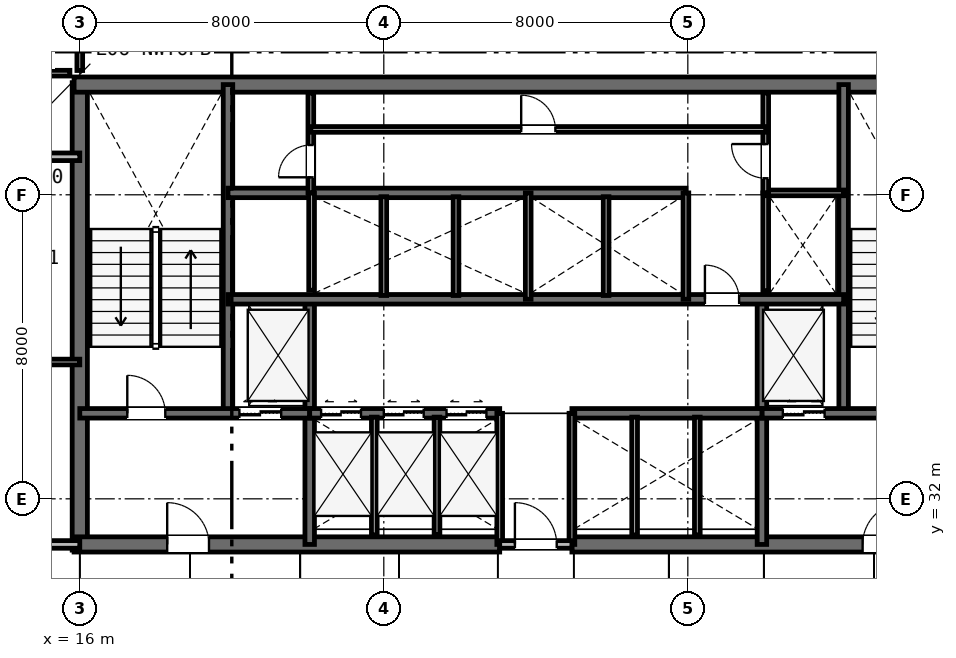
"""IFC4 building model, lengths in metres.
Left out: names, types, materials, properties, quantities, classifications, styles, units other than length and angle.
Written with IfcOpenShell. Run it as: python <this file> out.ifc"""

import sys

from ifc_helpers import new_model, si_unit, direction, frame, frame_2d, origin, place, context, subcontext, project, spatial, rectangle, extrude, element, fill, save


model = new_model("IFC4")
c1 = context("Model", 3, precision=1e-05, world=origin(), true_north=direction((0.0, 1.0)))
c2 = subcontext(c1, "Body", "Model", "MODEL_VIEW")
j1 = project(units=[si_unit("LENGTHUNIT", "METRE"), si_unit("PLANEANGLEUNIT", "RADIAN")], contexts=[c1])
p1 = place(None, origin())
s1 = spatial("IfcSite", under=j1, at=p1, CompositionType="ELEMENT")
p2 = place(p1, origin())
s2 = spatial("IfcBuilding", under=s1, at=p2, CompositionType="ELEMENT")
p3 = place(p2, frame((0.0, 0.0, 29.4)))
s3 = spatial("IfcBuildingStorey", under=s2, at=p3, CompositionType="ELEMENT", Elevation=29.4)
p4 = place(p3, frame((16.0, 30.65, 0.0), z_axis=(0.0, 0.0, 1.0), x_axis=(0.0, 1.0, 0.0)))
e1 = element("IfcWall", 1, at=p4, inside=s3, PredefinedType="SHEAR", context=c2, shape_type="SweptSolid", body=[
    extrude(rectangle(XDim=12.3, YDim=0.4, at=frame_2d((6.15, 0.0))), origin(), (0.0, 0.0, 1.0), 3.6),
])
p5 = place(p3, frame((15.85, 42.9, 0.0), z_axis=(0.0, 0.0, 1.0), x_axis=(1.0, 0.0, 0.0)))
e2 = element("IfcWall", 2, at=p5, inside=s3, PredefinedType="SHEAR", context=c2, shape_type="SweptSolid", body=[
    extrude(rectangle(XDim=24.3, YDim=0.4, at=frame_2d((12.15, 0.0))), origin(), (0.0, 0.0, 1.0), 3.6),
])
p6 = place(p3, frame((15.85, 30.8, 0.0), z_axis=(0.0, 0.0, 1.0), x_axis=(1.0, 0.0, 0.0)))
e3 = element("IfcWall", 3, at=p6, inside=s3, PredefinedType="SHEAR", context=c2, shape_type="SweptSolid", body=[
    extrude(rectangle(XDim=11.2, YDim=0.4, at=frame_2d((5.6, 0.0))), origin(), (0.0, 0.0, 1.0), 3.6),
])
p7 = place(p6, frame((2.45, 0.0, 0.0)))
e4 = element("IfcOpeningElement", 4, at=p7, cuts=e3, PredefinedType="OPENING", context=c2, shape_type="SweptSolid", body=[
    extrude(rectangle(XDim=1.1, YDim=2.15, at=frame_2d((0.55, 1.075))), frame((0.0, 0.21, 0.0), z_axis=(0.0, -1.0, 0.0), x_axis=(1.0, 0.0, 0.0)), (0.0, 0.0, 1.0), 0.42),
])
p8 = place(p3, frame((28.95, 30.8, 0.0), z_axis=(0.0, 0.0, 1.0), x_axis=(1.0, 0.0, 0.0)))
e5 = element("IfcWall", 5, at=p8, inside=s3, PredefinedType="SHEAR", context=c2, shape_type="SweptSolid", body=[
    extrude(rectangle(XDim=11.2, YDim=0.4, at=frame_2d((5.6, 0.0))), origin(), (0.0, 0.0, 1.0), 3.6),
])
p9 = place(p8, frame((7.65, 0.0, 0.0)))
e6 = element("IfcOpeningElement", 6, at=p9, cuts=e5, PredefinedType="OPENING", context=c2, shape_type="SweptSolid", body=[
    extrude(rectangle(XDim=1.1, YDim=2.15, at=frame_2d((0.55, 1.075))), frame((0.0, 0.21, 0.0), z_axis=(0.0, -1.0, 0.0), x_axis=(1.0, 0.0, 0.0)), (0.0, 0.0, 1.0), 0.42),
])
for number, where, z_axis, x_axis in (
    (7, (19.9, 34.25, 0.0), (0.0, 0.0, 1.0), (0.0, 1.0, 0.0)),
    (8, (36.1, 34.25, 0.0), (0.0, 0.0, 1.0), (0.0, 1.0, 0.0)),
):
    element("IfcWall", number, at=place(p3, frame(where, z_axis=z_axis, x_axis=x_axis)), inside=s3, PredefinedType="SHEAR", context=c2, shape_type="SweptSolid", body=[
        extrude(rectangle(XDim=8.65, YDim=0.25, at=frame_2d((4.325, 0.0))), origin(), (0.0, 0.0, 1.0), 3.6),
    ])
for number, where, z_axis, x_axis in (
    (9, (22.05, 30.8, 0.0), (0.0, 0.0, 1.0), (0.0, 1.0, 0.0)),
    (10, (33.95, 30.8, 0.0), (0.0, 0.0, 1.0), (0.0, 1.0, 0.0)),
):
    element("IfcWall", number, at=place(p3, frame(where, z_axis=z_axis, x_axis=x_axis)), inside=s3, PredefinedType="SHEAR", context=c2, shape_type="SweptSolid", body=[
        extrude(rectangle(XDim=6.45, YDim=0.25, at=frame_2d((3.225, 0.0))), origin(), (0.0, 0.0, 1.0), 3.6),
    ])
p10 = place(p3, frame((16.0, 34.25, 0.0), z_axis=(0.0, 0.0, 1.0), x_axis=(1.0, 0.0, 0.0)))
e11 = element("IfcWall", 11, at=p10, inside=s3, PredefinedType="SHEAR", context=c2, shape_type="SweptSolid", body=[
    extrude(rectangle(XDim=6.05, YDim=0.25, at=frame_2d((3.025, 0.0))), origin(), (0.0, 0.0, 1.0), 3.6),
])
p11 = place(p10, frame((1.25, 0.0, 0.0)))
e12 = element("IfcOpeningElement", 12, at=p11, cuts=e11, PredefinedType="OPENING", context=c2, shape_type="SweptSolid", body=[
    extrude(rectangle(XDim=1.0, YDim=2.15, at=frame_2d((0.5, 1.075))), frame((0.0, 0.135, 0.0), z_axis=(0.0, -1.0, 0.0), x_axis=(1.0, 0.0, 0.0)), (0.0, 0.0, 1.0), 0.27),
])
p12 = place(p10, frame((4.2, 0.0, 0.0)))
e13 = element("IfcOpeningElement", 13, at=p12, cuts=e11, PredefinedType="OPENING", context=c2, shape_type="SweptSolid", body=[
    extrude(rectangle(XDim=1.1, YDim=2.15, at=frame_2d((0.55, 1.075))), frame((0.0, 0.135, 0.0), z_axis=(0.0, -1.0, 0.0), x_axis=(1.0, 0.0, 0.0)), (0.0, 0.0, 1.0), 0.27),
])
p13 = place(p3, frame((33.95, 34.25, 0.0), z_axis=(0.0, 0.0, 1.0), x_axis=(1.0, 0.0, 0.0)))
e14 = element("IfcWall", 14, at=p13, inside=s3, PredefinedType="SHEAR", context=c2, shape_type="SweptSolid", body=[
    extrude(rectangle(XDim=6.05, YDim=0.25, at=frame_2d((3.025, 0.0))), origin(), (0.0, 0.0, 1.0), 3.6),
])
p14 = place(p13, frame((3.7, 0.0, 0.0)))
e15 = element("IfcOpeningElement", 15, at=p14, cuts=e14, PredefinedType="OPENING", context=c2, shape_type="SweptSolid", body=[
    extrude(rectangle(XDim=1.0, YDim=2.15, at=frame_2d((0.5, 1.075))), frame((0.0, 0.135, 0.0), z_axis=(0.0, -1.0, 0.0), x_axis=(1.0, 0.0, 0.0)), (0.0, 0.0, 1.0), 0.27),
])
p15 = place(p13, frame((0.55, 0.0, 0.0)))
e16 = element("IfcOpeningElement", 16, at=p15, cuts=e14, PredefinedType="OPENING", context=c2, shape_type="SweptSolid", body=[
    extrude(rectangle(XDim=1.1, YDim=2.15, at=frame_2d((0.55, 1.075))), frame((0.0, 0.135, 0.0), z_axis=(0.0, -1.0, 0.0), x_axis=(1.0, 0.0, 0.0)), (0.0, 0.0, 1.0), 0.27),
])
p16 = place(p3, frame((22.05, 34.25, 0.0), z_axis=(0.0, 0.0, 1.0), x_axis=(1.0, 0.0, 0.0)))
e17 = element("IfcWall", 17, at=p16, inside=s3, PredefinedType="SHEAR", context=c2, shape_type="SweptSolid", body=[
    extrude(rectangle(XDim=5.0, YDim=0.25, at=frame_2d((2.5, 0.0))), origin(), (0.0, 0.0, 1.0), 3.6),
])
p17 = place(p16, frame((0.3, 0.0, 0.0)))
e18 = element("IfcOpeningElement", 18, at=p17, cuts=e17, PredefinedType="OPENING", context=c2, shape_type="SweptSolid", body=[
    extrude(rectangle(XDim=1.05, YDim=2.15, at=frame_2d((0.525, 1.075))), frame((0.0, 0.135, 0.0), z_axis=(0.0, -1.0, 0.0), x_axis=(1.0, 0.0, 0.0)), (0.0, 0.0, 1.0), 0.27),
])
p18 = place(p16, frame((1.95, 0.0, 0.0)))
e19 = element("IfcOpeningElement", 19, at=p18, cuts=e17, PredefinedType="OPENING", context=c2, shape_type="SweptSolid", body=[
    extrude(rectangle(XDim=1.05, YDim=2.15, at=frame_2d((0.525, 1.075))), frame((0.0, 0.135, 0.0), z_axis=(0.0, -1.0, 0.0), x_axis=(1.0, 0.0, 0.0)), (0.0, 0.0, 1.0), 0.27),
])
p19 = place(p16, frame((3.6, 0.0, 0.0)))
e20 = element("IfcOpeningElement", 20, at=p19, cuts=e17, PredefinedType="OPENING", context=c2, shape_type="SweptSolid", body=[
    extrude(rectangle(XDim=1.05, YDim=2.15, at=frame_2d((0.525, 1.075))), frame((0.0, 0.135, 0.0), z_axis=(0.0, -1.0, 0.0), x_axis=(1.0, 0.0, 0.0)), (0.0, 0.0, 1.0), 0.27),
])
p20 = place(p3, frame((28.95, 34.25, 0.0), z_axis=(0.0, 0.0, 1.0), x_axis=(1.0, 0.0, 0.0)))
e21 = element("IfcWall", 21, at=p20, inside=s3, PredefinedType="SHEAR", context=c2, shape_type="SweptSolid", body=[
    extrude(rectangle(XDim=5.0, YDim=0.25, at=frame_2d((2.5, 0.0))), origin(), (0.0, 0.0, 1.0), 3.6),
])
p21 = place(p3, frame((19.9, 37.25, 0.0), z_axis=(0.0, 0.0, 1.0), x_axis=(1.0, 0.0, 0.0)))
e22 = element("IfcWall", 22, at=p21, inside=s3, PredefinedType="SHEAR", context=c2, shape_type="SweptSolid", body=[
    extrude(rectangle(XDim=16.2, YDim=0.25, at=frame_2d((8.1, 0.0))), origin(), (0.0, 0.0, 1.0), 3.6),
])
p22 = place(p21, frame((12.55, 0.0, 0.0)))
e23 = element("IfcOpeningElement", 23, at=p22, cuts=e22, PredefinedType="OPENING", context=c2, shape_type="SweptSolid", body=[
    extrude(rectangle(XDim=0.9, YDim=2.15, at=frame_2d((0.45, 1.075))), frame((0.0, 0.135, 0.0), z_axis=(0.0, -1.0, 0.0), x_axis=(1.0, 0.0, 0.0)), (0.0, 0.0, 1.0), 0.27),
])
p23 = place(p3, frame((19.9, 40.05, 0.0), z_axis=(0.0, 0.0, 1.0), x_axis=(1.0, 0.0, 0.0)))
e24 = element("IfcWall", 24, at=p23, inside=s3, PredefinedType="SHEAR", context=c2, shape_type="SweptSolid", body=[
    extrude(rectangle(XDim=12.05, YDim=0.25, at=frame_2d((6.025, 0.0))), origin(), (0.0, 0.0, 1.0), 3.6),
])
for number, where, z_axis, x_axis in (
    (25, (27.05, 30.8, 0.0), (0.0, 0.0, 1.0), (0.0, 1.0, 0.0)),
    (26, (28.95, 30.8, 0.0), (0.0, 0.0, 1.0), (0.0, 1.0, 0.0)),
):
    element("IfcWall", number, at=place(p3, frame(where, z_axis=z_axis, x_axis=x_axis)), inside=s3, PredefinedType="PLUMBINGWALL", context=c2, shape_type="SweptSolid", body=[
        extrude(rectangle(XDim=3.45, YDim=0.15, at=frame_2d((1.725, 0.0))), origin(), (0.0, 0.0, 1.0), 3.33),
    ])
p24 = place(p3, frame((27.05, 30.8, 0.0), z_axis=(0.0, 0.0, 1.0), x_axis=(1.0, 0.0, 0.0)))
e27 = element("IfcWall", 27, at=p24, inside=s3, PredefinedType="PARTITIONING", context=c2, shape_type="SweptSolid", body=[
    extrude(rectangle(XDim=1.9, YDim=0.2, at=frame_2d((0.95, 0.0))), origin(), (0.0, 0.0, 1.0), 3.33),
])
p25 = place(p24, frame((0.4, 0.0, 0.0)))
e28 = element("IfcOpeningElement", 28, at=p25, cuts=e27, PredefinedType="OPENING", context=c2, shape_type="SweptSolid", body=[
    extrude(rectangle(XDim=1.1, YDim=2.15, at=frame_2d((0.55, 1.075))), frame((0.0, 0.11, 0.0), z_axis=(0.0, -1.0, 0.0), x_axis=(1.0, 0.0, 0.0)), (0.0, 0.0, 1.0), 0.22),
])
for number, where, z_axis, x_axis in (
    (29, (23.75, 31.05, 0.0), (0.0, 0.0, 1.0), (0.0, 1.0, 0.0)),
    (30, (25.4, 31.05, 0.0), (0.0, 0.0, 1.0), (0.0, 1.0, 0.0)),
    (31, (30.6, 31.05, 0.0), (0.0, 0.0, 1.0), (0.0, 1.0, 0.0)),
    (32, (32.25, 31.05, 0.0), (0.0, 0.0, 1.0), (0.0, 1.0, 0.0)),
):
    element("IfcWall", number, at=place(p3, frame(where, z_axis=z_axis, x_axis=x_axis)), inside=s3, PredefinedType="PLUMBINGWALL", context=c2, shape_type="SweptSolid", body=[
        extrude(rectangle(XDim=3.1, YDim=0.15, at=frame_2d((1.55, 0.0))), origin(), (0.0, 0.0, 1.0), 3.33),
    ])
p26 = place(p3, frame((22.1, 37.49, 0.0), z_axis=(0.0, 0.0, 1.0), x_axis=(0.0, 1.0, 0.0)))
e33 = element("IfcWall", 33, at=p26, inside=s3, PredefinedType="PLUMBINGWALL", context=c2, shape_type="SweptSolid", body=[
    extrude(rectangle(XDim=2.56, YDim=0.15, at=frame_2d((1.28, 0.0))), origin(), (0.0, 0.0, 1.0), 3.33),
])
p27 = place(p3, frame((27.8, 37.25, 0.0), z_axis=(0.0, 0.0, 1.0), x_axis=(0.0, 1.0, 0.0)))
e34 = element("IfcWall", 34, at=p27, inside=s3, PredefinedType="PLUMBINGWALL", context=c2, shape_type="SweptSolid", body=[
    extrude(rectangle(XDim=2.8, YDim=0.15, at=frame_2d((1.4, 0.0))), origin(), (0.0, 0.0, 1.0), 3.33),
])
for number, where, z_axis, x_axis in (
    (35, (24.0, 37.35, 0.0), (0.0, 0.0, 1.0), (0.0, 1.0, 0.0)),
    (36, (25.9, 37.35, 0.0), (0.0, 0.0, 1.0), (0.0, 1.0, 0.0)),
):
    element("IfcWall", number, at=place(p3, frame(where, z_axis=z_axis, x_axis=x_axis)), inside=s3, PredefinedType="PLUMBINGWALL", context=c2, shape_type="SweptSolid", body=[
        extrude(rectangle(XDim=2.6, YDim=0.15, at=frame_2d((1.3, 0.0))), origin(), (0.0, 0.0, 1.0), 3.33),
    ])
p28 = place(p3, frame((31.95, 37.25, 0.0), z_axis=(0.0, 0.0, 1.0), x_axis=(0.0, 1.0, 0.0)))
e37 = element("IfcWall", 37, at=p28, inside=s3, PredefinedType="PLUMBINGWALL", context=c2, shape_type="SweptSolid", body=[
    extrude(rectangle(XDim=2.8, YDim=0.15, at=frame_2d((1.4, 0.0))), origin(), (0.0, 0.0, 1.0), 3.33),
])
p29 = place(p3, frame((29.85, 37.35, 0.0), z_axis=(0.0, 0.0, 1.0), x_axis=(0.0, 1.0, 0.0)))
e38 = element("IfcWall", 38, at=p29, inside=s3, PredefinedType="PLUMBINGWALL", context=c2, shape_type="SweptSolid", body=[
    extrude(rectangle(XDim=2.6, YDim=0.15, at=frame_2d((1.3, 0.0))), origin(), (0.0, 0.0, 1.0), 3.33),
])
p30 = place(p3, frame((34.05, 37.473, 0.0), z_axis=(0.0, 0.0, 1.0), x_axis=(0.0, 1.0, 0.0)))
e39 = element("IfcWall", 39, at=p30, inside=s3, PredefinedType="PLUMBINGWALL", context=c2, shape_type="SweptSolid", body=[
    extrude(rectangle(XDim=2.577, YDim=0.15, at=frame_2d((1.288, 0.0))), origin(), (0.0, 0.0, 1.0), 3.33),
])
p31 = place(p3, frame((34.05, 40.05, 0.0), z_axis=(0.0, 0.0, 1.0), x_axis=(1.0, 0.0, 0.0)))
e40 = element("IfcWall", 40, at=p31, inside=s3, PredefinedType="PARTITIONING", context=c2, shape_type="SweptSolid", body=[
    extrude(rectangle(XDim=2.05, YDim=0.15, at=frame_2d((1.025, 0.0))), origin(), (0.0, 0.0, 1.0), 3.33),
])
p32 = place(p3, frame((34.05, 40.05, 0.0), z_axis=(0.0, 0.0, 1.0), x_axis=(0.0, 1.0, 0.0)))
e41 = element("IfcWall", 41, at=p32, inside=s3, PredefinedType="PARTITIONING", context=c2, shape_type="SweptSolid", body=[
    extrude(rectangle(XDim=2.63, YDim=0.15, at=frame_2d((1.315, 0.0))), origin(), (0.0, 0.0, 1.0), 3.33),
])
p33 = place(p32, frame((0.385, 0.0, 0.0)))
e42 = element("IfcOpeningElement", 42, at=p33, cuts=e41, PredefinedType="OPENING", context=c2, shape_type="SweptSolid", body=[
    extrude(rectangle(XDim=0.9, YDim=2.15, at=frame_2d((0.45, 1.075))), frame((0.0, 0.085, 0.0), z_axis=(0.0, -1.0, 0.0), x_axis=(1.0, 0.0, 0.0)), (0.0, 0.0, 1.0), 0.17),
])
p34 = place(p3, frame((22.08, 40.05, 0.0), z_axis=(0.0, 0.0, 1.0), x_axis=(0.0, 1.0, 0.0)))
e43 = element("IfcWall", 43, at=p34, inside=s3, PredefinedType="PARTITIONING", context=c2, shape_type="SweptSolid", body=[
    extrude(rectangle(XDim=2.63, YDim=0.15, at=frame_2d((1.315, 0.0))), origin(), (0.0, 0.0, 1.0), 3.33),
])
p35 = place(p34, frame((0.41, 0.0, 0.0)))
e44 = element("IfcOpeningElement", 44, at=p35, cuts=e43, PredefinedType="OPENING", context=c2, shape_type="SweptSolid", body=[
    extrude(rectangle(XDim=0.85, YDim=2.15, at=frame_2d((0.425, 1.075))), frame((0.0, 0.085, 0.0), z_axis=(0.0, -1.0, 0.0), x_axis=(1.0, 0.0, 0.0)), (0.0, 0.0, 1.0), 0.17),
])
p36 = place(p3, frame((22.08, 41.72, 0.0), z_axis=(0.0, 0.0, 1.0), x_axis=(1.0, 0.0, 0.0)))
e45 = element("IfcWall", 45, at=p36, inside=s3, PredefinedType="PARTITIONING", context=c2, shape_type="SweptSolid", body=[
    extrude(rectangle(XDim=11.97, YDim=0.15, at=frame_2d((5.985, 0.0))), origin(), (0.0, 0.0, 1.0), 3.33),
])
p37 = place(p36, frame((5.535, 0.0, 0.0)))
e46 = element("IfcOpeningElement", 46, at=p37, cuts=e45, PredefinedType="OPENING", context=c2, shape_type="SweptSolid", body=[
    extrude(rectangle(XDim=0.9, YDim=2.15, at=frame_2d((0.45, 1.075))), frame((0.0, 0.085, 0.0), z_axis=(0.0, -1.0, 0.0), x_axis=(1.0, 0.0, 0.0)), (0.0, 0.0, 1.0), 0.17),
])
p38 = place(p3, frame((8.3, 35.6, 0.0), z_axis=(0.0, 0.0, 1.0), x_axis=(1.0, 0.0, 0.0)))
e47 = element("IfcWall", 47, at=p38, inside=s3, PredefinedType="PARTITIONING", context=c2, shape_type="SweptSolid", body=[
    extrude(rectangle(XDim=7.7, YDim=0.15, at=frame_2d((3.85, 0.0))), origin(), (0.0, 0.0, 1.0), 2.68),
])
p39 = place(p3, frame((8.3, 30.8, 0.0), z_axis=(0.0, 0.0, 1.0), x_axis=(1.0, 0.0, 0.0)))
e48 = element("IfcWall", 48, at=p39, inside=s3, PredefinedType="PARTITIONING", context=c2, shape_type="SweptSolid", body=[
    extrude(rectangle(XDim=7.7, YDim=0.2, at=frame_2d((3.85, 0.0))), origin(), (0.0, 0.0, 1.0), 2.68),
])
p40 = place(p39, frame((5.325, 0.0, 0.0)))
e49 = element("IfcOpeningElement", 49, at=p40, cuts=e48, PredefinedType="OPENING", context=c2, shape_type="SweptSolid", body=[
    extrude(rectangle(XDim=0.95, YDim=2.15, at=frame_2d((0.475, 1.075))), frame((0.0, 0.11, 0.0), z_axis=(0.0, -1.0, 0.0), x_axis=(1.0, 0.0, 0.0)), (0.0, 0.0, 1.0), 0.22),
])
p41 = place(p3, frame((0.1, 41.0, 0.0), z_axis=(0.0, 0.0, 1.0), x_axis=(1.0, 0.0, 0.0)))
e50 = element("IfcWall", 50, at=p41, inside=s3, PredefinedType="PARTITIONING", context=c2, shape_type="SweptSolid", body=[
    extrude(rectangle(XDim=15.9, YDim=0.2, at=frame_2d((7.95, 0.0))), origin(), (0.0, 0.0, 1.0), 2.68),
])
p42 = place(p41, frame((6.779, 0.0, 0.0)))
e51 = element("IfcOpeningElement", 51, at=p42, cuts=e50, PredefinedType="OPENING", context=c2, shape_type="SweptSolid", body=[
    extrude(rectangle(XDim=0.95, YDim=2.15, at=frame_2d((0.475, 1.075))), frame((0.0, 0.11, 0.0), z_axis=(0.0, -1.0, 0.0), x_axis=(1.0, 0.0, 0.0)), (0.0, 0.0, 1.0), 0.22),
])
p43 = place(p3, frame((13.55, 43.2, 0.0), z_axis=(0.0, 0.0, 1.0), x_axis=(1.0, 0.0, 0.0)))
e52 = element("IfcWall", 52, at=p43, inside=s3, PredefinedType="PARTITIONING", context=c2, shape_type="SweptSolid", body=[
    extrude(rectangle(XDim=2.19, YDim=0.15, at=frame_2d((1.095, 0.0))), origin(), (0.0, 0.0, 1.0), 3.33),
])
p44 = place(p3, frame((16.0, 43.27, 0.0), z_axis=(0.0, 0.0, 1.0), x_axis=(0.0, 1.0, 0.0)))
e53 = element("IfcWall", 53, at=p44, inside=s3, PredefinedType="PARTITIONING", context=c2, shape_type="SweptSolid", body=[
    extrude(rectangle(XDim=4.63, YDim=0.15, at=frame_2d((2.315, 0.0))), origin(), (0.0, 0.0, 1.0), 2.87),
])
p45 = place(p25, origin())
e54 = element("IfcDoor", 54, at=p45, inside=s3, OperationType="SINGLE_SWING_LEFT", PredefinedType="DOOR", context=c2, shape_type="SweptSolid", body=[
    extrude(rectangle(XDim=1.1, YDim=2.15, at=frame_2d((0.55, 1.075))), frame((0.0, 0.025, 0.0), z_axis=(0.0, -1.0, 0.0), x_axis=(1.0, 0.0, 0.0)), (0.0, 0.0, 1.0), 0.05),
])
fill(e28, e54)
p46 = place(p11, origin())
e55 = element("IfcDoor", 55, at=p46, inside=s3, OperationType="SINGLE_SWING_LEFT", PredefinedType="DOOR", context=c2, shape_type="SweptSolid", body=[
    extrude(rectangle(XDim=1.0, YDim=2.15, at=frame_2d((0.5, 1.075))), frame((0.0, 0.025, 0.0), z_axis=(0.0, -1.0, 0.0), x_axis=(1.0, 0.0, 0.0)), (0.0, 0.0, 1.0), 0.05),
])
fill(e12, e55)
p47 = place(p7, origin())
e56 = element("IfcDoor", 56, at=p47, inside=s3, OperationType="SINGLE_SWING_LEFT", PredefinedType="DOOR", context=c2, shape_type="SweptSolid", body=[
    extrude(rectangle(XDim=1.1, YDim=2.15, at=frame_2d((0.55, 1.075))), frame((0.0, 0.025, 0.0), z_axis=(0.0, -1.0, 0.0), x_axis=(1.0, 0.0, 0.0)), (0.0, 0.0, 1.0), 0.05),
])
fill(e4, e56)
p48 = place(p9, origin())
e57 = element("IfcDoor", 57, at=p48, inside=s3, OperationType="SINGLE_SWING_RIGHT", PredefinedType="DOOR", context=c2, shape_type="SweptSolid", body=[
    extrude(rectangle(XDim=1.1, YDim=2.15, at=frame_2d((0.55, 1.075))), frame((0.0, 0.025, 0.0), z_axis=(0.0, -1.0, 0.0), x_axis=(1.0, 0.0, 0.0)), (0.0, 0.0, 1.0), 0.05),
])
fill(e6, e57)
p49 = place(p22, origin())
e58 = element("IfcDoor", 58, at=p49, inside=s3, OperationType="SINGLE_SWING_LEFT", PredefinedType="DOOR", context=c2, shape_type="SweptSolid", body=[
    extrude(rectangle(XDim=0.9, YDim=2.15, at=frame_2d((0.45, 1.075))), frame((0.0, 0.025, 0.0), z_axis=(0.0, -1.0, 0.0), x_axis=(1.0, 0.0, 0.0)), (0.0, 0.0, 1.0), 0.05),
])
fill(e23, e58)
p50 = place(p33, origin())
e59 = element("IfcDoor", 59, at=p50, inside=s3, OperationType="SINGLE_SWING_RIGHT", PredefinedType="DOOR", context=c2, shape_type="SweptSolid", body=[
    extrude(rectangle(XDim=0.9, YDim=2.15, at=frame_2d((0.45, 1.075))), frame((0.0, 0.025, 0.0), z_axis=(0.0, -1.0, 0.0), x_axis=(1.0, 0.0, 0.0)), (0.0, 0.0, 1.0), 0.05),
])
fill(e42, e59)
p51 = place(p35, origin())
e60 = element("IfcDoor", 60, at=p51, inside=s3, OperationType="SINGLE_SWING_LEFT", PredefinedType="DOOR", context=c2, shape_type="SweptSolid", body=[
    extrude(rectangle(XDim=0.85, YDim=2.15, at=frame_2d((0.425, 1.075))), frame((0.0, 0.025, 0.0), z_axis=(0.0, -1.0, 0.0), x_axis=(1.0, 0.0, 0.0)), (0.0, 0.0, 1.0), 0.05),
])
fill(e44, e60)
p52 = place(p37, origin())
e61 = element("IfcDoor", 61, at=p52, inside=s3, OperationType="SINGLE_SWING_LEFT", PredefinedType="DOOR", context=c2, shape_type="SweptSolid", body=[
    extrude(rectangle(XDim=0.9, YDim=2.15, at=frame_2d((0.45, 1.075))), frame((0.0, 0.025, 0.0), z_axis=(0.0, -1.0, 0.0), x_axis=(1.0, 0.0, 0.0)), (0.0, 0.0, 1.0), 0.05),
])
fill(e46, e61)
p53 = place(p12, origin())
e62 = element("IfcDoor", 62, at=p53, inside=s3, OperationType="DOUBLE_DOOR_SLIDING", PredefinedType="DOOR", context=c2, shape_type="SweptSolid", body=[
    extrude(rectangle(XDim=1.1, YDim=2.15, at=frame_2d((0.55, 1.075))), frame((0.0, 0.025, 0.0), z_axis=(0.0, -1.0, 0.0), x_axis=(1.0, 0.0, 0.0)), (0.0, 0.0, 1.0), 0.05),
])
fill(e13, e62)
p54 = place(p15, origin())
e63 = element("IfcDoor", 63, at=p54, inside=s3, OperationType="DOUBLE_DOOR_SLIDING", PredefinedType="DOOR", context=c2, shape_type="SweptSolid", body=[
    extrude(rectangle(XDim=1.1, YDim=2.15, at=frame_2d((0.55, 1.075))), frame((0.0, 0.025, 0.0), z_axis=(0.0, -1.0, 0.0), x_axis=(1.0, 0.0, 0.0)), (0.0, 0.0, 1.0), 0.05),
])
fill(e16, e63)
p55 = place(p17, origin())
e64 = element("IfcDoor", 64, at=p55, inside=s3, OperationType="DOUBLE_DOOR_SLIDING", PredefinedType="DOOR", context=c2, shape_type="SweptSolid", body=[
    extrude(rectangle(XDim=1.05, YDim=2.15, at=frame_2d((0.525, 1.075))), frame((0.0, 0.025, 0.0), z_axis=(0.0, -1.0, 0.0), x_axis=(1.0, 0.0, 0.0)), (0.0, 0.0, 1.0), 0.05),
])
fill(e18, e64)
p56 = place(p18, origin())
e65 = element("IfcDoor", 65, at=p56, inside=s3, OperationType="DOUBLE_DOOR_SLIDING", PredefinedType="DOOR", context=c2, shape_type="SweptSolid", body=[
    extrude(rectangle(XDim=1.05, YDim=2.15, at=frame_2d((0.525, 1.075))), frame((0.0, 0.025, 0.0), z_axis=(0.0, -1.0, 0.0), x_axis=(1.0, 0.0, 0.0)), (0.0, 0.0, 1.0), 0.05),
])
fill(e19, e65)
p57 = place(p19, origin())
e66 = element("IfcDoor", 66, at=p57, inside=s3, OperationType="DOUBLE_DOOR_SLIDING", PredefinedType="DOOR", context=c2, shape_type="SweptSolid", body=[
    extrude(rectangle(XDim=1.05, YDim=2.15, at=frame_2d((0.525, 1.075))), frame((0.0, 0.025, 0.0), z_axis=(0.0, -1.0, 0.0), x_axis=(1.0, 0.0, 0.0)), (0.0, 0.0, 1.0), 0.05),
])
fill(e20, e66)
save(model, sys.argv[1])
